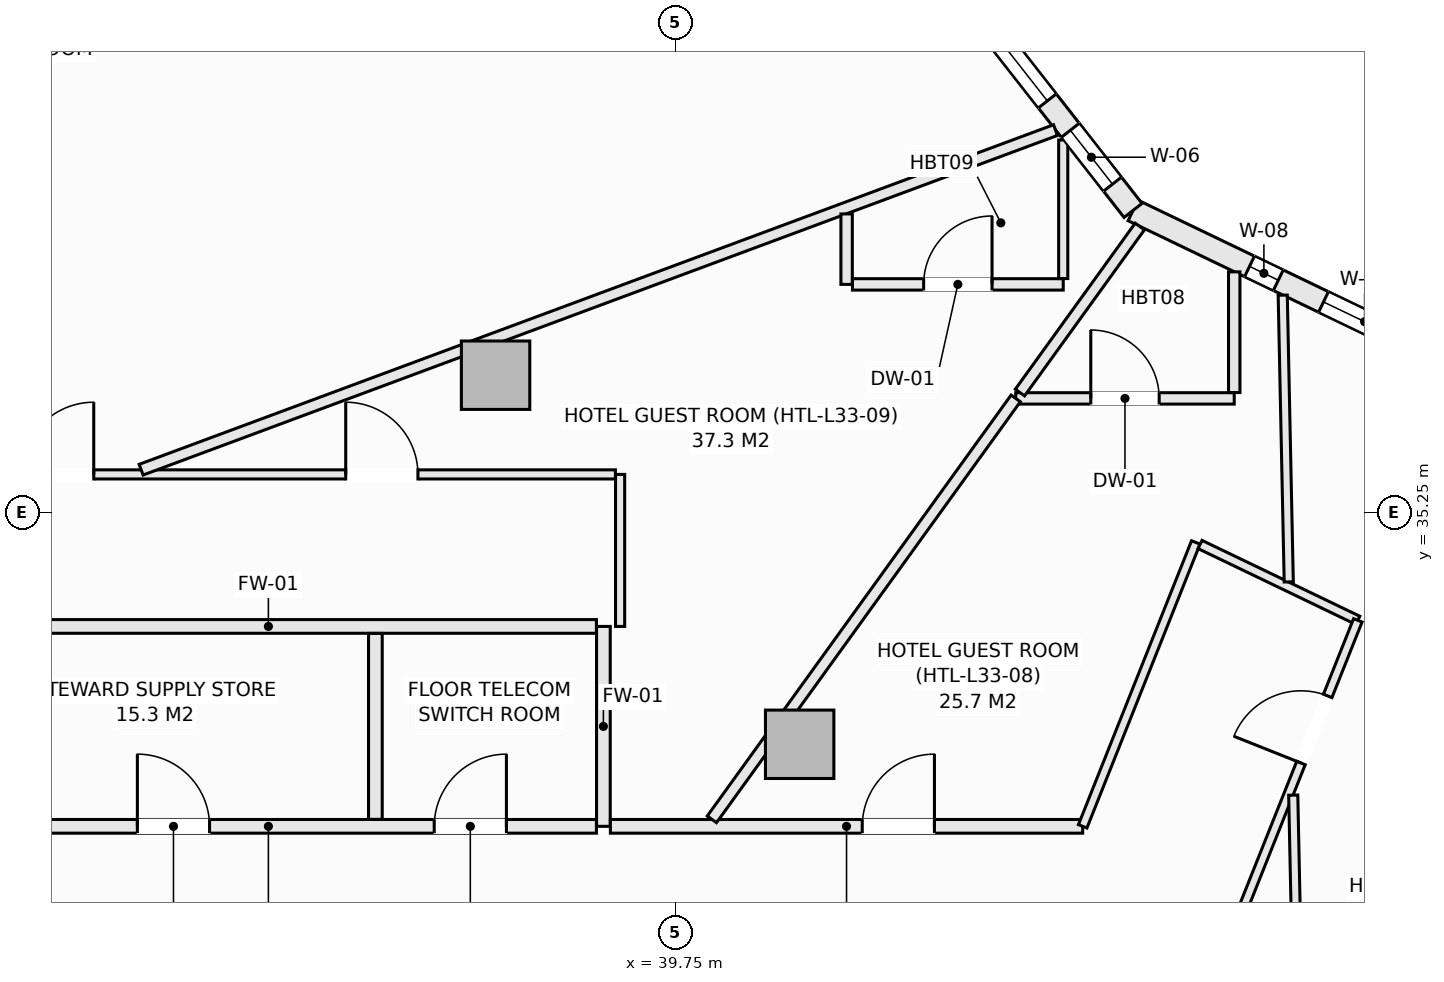
"""IFC4 building model, lengths in metres.
Left out: names, types, materials, properties, quantities, classifications, styles, units other than length and angle.
Written with IfcOpenShell. Run it as: python <this file> out.ifc"""

import sys

from ifc_helpers import new_model, si_unit, direction, frame, frame_2d, origin, origin_2d, place, context, subcontext, project, spatial, rectangle, extrude, element, fill, save


model = new_model("IFC4")
c1 = context("Model", 3, precision=1e-05, world=origin(), true_north=direction((0.0, 1.0)))
c2 = subcontext(c1, "Body", "Model", "MODEL_VIEW")
j1 = project(units=[si_unit("LENGTHUNIT", "METRE"), si_unit("PLANEANGLEUNIT", "RADIAN")], contexts=[c1])
p1 = place(None, origin())
s1 = spatial("IfcSite", under=j1, at=p1, CompositionType="ELEMENT")
p2 = place(p1, origin())
s2 = spatial("IfcBuilding", under=s1, at=p2, CompositionType="ELEMENT")
p3 = place(p2, frame((0.0, 0.0, 132.5)))
s3 = spatial("IfcBuildingStorey", under=s2, at=p3, CompositionType="ELEMENT", Elevation=132.5)
for number, where, z_axis, x_axis in (
    (1, (41.382, 32.199, -0.27), (0.0, 0.0, 1.0), (1.0, 0.0, 0.0)),
    (2, (37.382, 37.055, -0.27), (0.0, 0.0, 1.0), (1.0, 0.0, 0.0)),
):
    element("IfcColumn", number, at=place(p3, frame(where, z_axis=z_axis, x_axis=x_axis)), inside=s3, PredefinedType="COLUMN", context=c2, shape_type="SweptSolid", body=[
        extrude(rectangle(XDim=0.9, YDim=0.9, at=origin_2d()), origin(), (0.0, 0.0, 1.0), 3.4),
    ])
p4 = place(p3, frame((45.769, 39.223, 0.0), z_axis=(0.0, 0.0, 1.0), x_axis=(0.901370184739, -0.433049408339, 0.0)))
e3 = element("IfcWall", 3, at=p4, inside=s3, PredefinedType="SOLIDWALL", context=c2, shape_type="SweptSolid", body=[
    extrude(rectangle(XDim=5.884, YDim=0.3, at=frame_2d((2.942, 0.0))), origin(), (0.0, 0.0, 1.0), 2.653),
])
p5 = place(p4, frame((2.78, 0.0, 0.72)))
e4 = element("IfcOpeningElement", 4, at=p5, cuts=e3, PredefinedType="OPENING", context=c2, shape_type="SweptSolid", body=[
    extrude(rectangle(XDim=1.2, YDim=1.65, at=frame_2d((0.6, 0.825))), frame((0.0, 0.16, 0.0), z_axis=(0.0, -1.0, 0.0), x_axis=(1.0, 0.0, 0.0)), (0.0, 0.0, 1.0), 0.32),
])
p6 = place(p4, frame((1.7, 0.0, 0.72)))
e5 = element("IfcOpeningElement", 5, at=p6, cuts=e3, PredefinedType="OPENING", context=c2, shape_type="SweptSolid", body=[
    extrude(rectangle(XDim=0.42, YDim=1.65, at=frame_2d((0.21, 0.825))), frame((0.0, 0.16, 0.0), z_axis=(0.0, -1.0, 0.0), x_axis=(1.0, 0.0, 0.0)), (0.0, 0.0, 1.0), 0.32),
])
p7 = place(p3, frame((42.219, 43.758, 0.0), z_axis=(0.0, 0.0, 1.0), x_axis=(0.616435134162, -0.787405693001, 0.0)))
e6 = element("IfcWall", 6, at=p7, inside=s3, PredefinedType="SOLIDWALL", context=c2, shape_type="SweptSolid", body=[
    extrude(rectangle(XDim=5.759, YDim=0.3, at=frame_2d((2.879, 0.0))), origin(), (0.0, 0.0, 1.0), 2.653),
])
p8 = place(p7, frame((1.829, 0.0, 0.74)))
e7 = element("IfcOpeningElement", 7, at=p8, cuts=e6, PredefinedType="OPENING", context=c2, shape_type="SweptSolid", body=[
    extrude(rectangle(XDim=2.1, YDim=1.7, at=frame_2d((1.05, 0.85))), frame((0.0, 0.16, 0.0), z_axis=(0.0, -1.0, 0.0), x_axis=(1.0, 0.0, 0.0)), (0.0, 0.0, 1.0), 0.32),
])
p9 = place(p7, frame((4.42, 0.0, 0.72)))
e8 = element("IfcOpeningElement", 8, at=p9, cuts=e6, PredefinedType="OPENING", context=c2, shape_type="SweptSolid", body=[
    extrude(rectangle(XDim=0.9, YDim=1.65, at=frame_2d((0.45, 0.825))), frame((0.0, 0.16, 0.0), z_axis=(0.0, -1.0, 0.0), x_axis=(1.0, 0.0, 0.0)), (0.0, 0.0, 1.0), 0.32),
])
p10 = place(p3, frame((38.8, 31.12, 0.0), z_axis=(0.0, 0.0, 1.0), x_axis=(0.0, 1.0, 0.0)))
e9 = element("IfcWall", 9, at=p10, inside=s3, PredefinedType="SOLIDWALL", context=c2, shape_type="SweptSolid", body=[
    extrude(rectangle(XDim=2.63, YDim=0.18, at=frame_2d((1.315, 0.0))), origin(), (0.0, 0.0, 1.0), 3.13),
])
p11 = place(p3, frame((30.077, 31.12, 0.0), z_axis=(0.0, 0.0, 1.0), x_axis=(1.0, 0.0, 0.0)))
e10 = element("IfcWall", 10, at=p11, inside=s3, PredefinedType="SOLIDWALL", context=c2, shape_type="SweptSolid", body=[
    extrude(rectangle(XDim=8.631, YDim=0.18, at=frame_2d((4.315, 0.0))), origin(), (0.0, 0.0, 1.0), 3.13),
])
p12 = place(p11, frame((2.592, 0.0, 0.0)))
e11 = element("IfcOpeningElement", 11, at=p12, cuts=e10, PredefinedType="OPENING", context=c2, shape_type="SweptSolid", body=[
    extrude(rectangle(XDim=0.95, YDim=2.1, at=frame_2d((0.475, 1.05))), frame((0.0, 0.1, 0.0), z_axis=(0.0, -1.0, 0.0), x_axis=(1.0, 0.0, 0.0)), (0.0, 0.0, 1.0), 0.2),
])
p13 = place(p11, frame((6.497, 0.0, 0.0)))
e12 = element("IfcOpeningElement", 12, at=p13, cuts=e10, PredefinedType="OPENING", context=c2, shape_type="SweptSolid", body=[
    extrude(rectangle(XDim=0.95, YDim=2.1, at=frame_2d((0.475, 1.05))), frame((0.0, 0.1, 0.0), z_axis=(0.0, -1.0, 0.0), x_axis=(1.0, 0.0, 0.0)), (0.0, 0.0, 1.0), 0.2),
])
p14 = place(p3, frame((38.892, 31.12, 0.0), z_axis=(0.0, 0.0, 1.0), x_axis=(1.0, 0.0, 0.0)))
e13 = element("IfcWall", 13, at=p14, inside=s3, PredefinedType="SOLIDWALL", context=c2, shape_type="SweptSolid", body=[
    extrude(rectangle(XDim=6.214, YDim=0.18, at=frame_2d((3.107, 0.0))), origin(), (0.0, 0.0, 1.0), 3.13),
])
p15 = place(p14, frame((3.313, 0.0, 0.0)))
e14 = element("IfcOpeningElement", 14, at=p15, cuts=e13, PredefinedType="OPENING", context=c2, shape_type="SweptSolid", body=[
    extrude(rectangle(XDim=0.95, YDim=2.1, at=frame_2d((0.475, 1.05))), frame((0.0, 0.1, 0.0), z_axis=(0.0, -1.0, 0.0), x_axis=(1.0, 0.0, 0.0)), (0.0, 0.0, 1.0), 0.2),
])
p16 = place(p3, frame((30.077, 33.75, 0.0), z_axis=(0.0, 0.0, 1.0), x_axis=(1.0, 0.0, 0.0)))
e15 = element("IfcWall", 15, at=p16, inside=s3, PredefinedType="SOLIDWALL", context=c2, shape_type="SweptSolid", body=[
    extrude(rectangle(XDim=8.631, YDim=0.18, at=frame_2d((4.315, 0.0))), origin(), (0.0, 0.0, 1.0), 3.13),
])
p17 = place(p3, frame((35.8, 31.212, 0.0), z_axis=(0.0, 0.0, 1.0), x_axis=(0.0, 1.0, 0.0)))
e16 = element("IfcWall", 16, at=p17, inside=s3, PredefinedType="SOLIDWALL", context=c2, shape_type="SweptSolid", body=[
    extrude(rectangle(XDim=2.446, YDim=0.18, at=frame_2d((1.223, 0.0))), origin(), (0.0, 0.0, 1.0), 3.13),
])
p18 = place(p3, frame((39.02, 33.75, 0.0), z_axis=(0.0, 0.0, 1.0), x_axis=(0.0, 1.0, 0.0)))
e17 = element("IfcWall", 17, at=p18, inside=s3, PredefinedType="PARTITIONING", context=c2, shape_type="SweptSolid", body=[
    extrude(rectangle(XDim=2.0, YDim=0.12, at=frame_2d((1.0, 0.0))), origin(), (0.0, 0.0, 1.0), 3.13),
])
p19 = place(p3, frame((29.842, 35.75, 0.0), z_axis=(0.0, 0.0, 1.0), x_axis=(1.0, 0.0, 0.0)))
e18 = element("IfcWall", 18, at=p19, inside=s3, PredefinedType="PARTITIONING", context=c2, shape_type="SweptSolid", body=[
    extrude(rectangle(XDim=9.116, YDim=0.12, at=frame_2d((4.558, 0.0))), origin(), (0.0, 0.0, 1.0), 2.505),
])
p20 = place(p19, frame((5.568, 0.0, 0.0)))
e19 = element("IfcOpeningElement", 19, at=p20, cuts=e18, PredefinedType="OPENING", context=c2, shape_type="SweptSolid", body=[
    extrude(rectangle(XDim=0.95, YDim=2.1, at=frame_2d((0.475, 1.05))), frame((0.0, 0.07, 0.0), z_axis=(0.0, -1.0, 0.0), x_axis=(1.0, 0.0, 0.0)), (0.0, 0.0, 1.0), 0.14),
])
p21 = place(p19, frame((1.302, 0.0, 0.0)))
e20 = element("IfcOpeningElement", 20, at=p21, cuts=e18, PredefinedType="OPENING", context=c2, shape_type="SweptSolid", body=[
    extrude(rectangle(XDim=0.95, YDim=2.1, at=frame_2d((0.475, 1.05))), frame((0.0, 0.07, 0.0), z_axis=(0.0, -1.0, 0.0), x_axis=(1.0, 0.0, 0.0)), (0.0, 0.0, 1.0), 0.14),
])
p22 = place(p3, frame((45.106, 31.12, 0.0), z_axis=(0.0, 0.0, 1.0), x_axis=(0.370123465787, 0.928982572535, 0.0)))
e21 = element("IfcWall", 21, at=p22, inside=s3, PredefinedType="PARTITIONING", context=c2, shape_type="SweptSolid", body=[
    extrude(rectangle(XDim=4.02, YDim=0.12, at=frame_2d((2.01, 0.0))), origin(), (0.0, 0.0, 1.0), 3.13),
])
p23 = place(p3, frame((46.65, 34.828, 0.0), z_axis=(0.0, 0.0, 1.0), x_axis=(0.901271525254, -0.433254703109, 0.0)))
e22 = element("IfcWall", 22, at=p23, inside=s3, PredefinedType="PARTITIONING", context=c2, shape_type="SweptSolid", body=[
    extrude(rectangle(XDim=2.304, YDim=0.12, at=frame_2d((1.152, 0.0))), origin(), (0.0, 0.0, 1.0), 3.13),
])
p24 = place(p3, frame((46.946, 29.363, 0.0), z_axis=(0.0, 0.0, 1.0), x_axis=(0.370173596818, 0.928962597858, 0.0)))
e23 = element("IfcWall", 23, at=p24, inside=s3, PredefinedType="PARTITIONING", context=c2, shape_type="SweptSolid", body=[
    extrude(rectangle(XDim=4.809, YDim=0.12, at=frame_2d((2.404, 0.0))), origin(), (0.0, 0.0, 1.0), 3.13),
])
p25 = place(p24, frame((2.788, 0.0, 0.0)))
e24 = element("IfcOpeningElement", 24, at=p25, cuts=e23, PredefinedType="OPENING", context=c2, shape_type="SweptSolid", body=[
    extrude(rectangle(XDim=0.95, YDim=2.1, at=frame_2d((0.475, 1.05))), frame((0.0, 0.07, 0.0), z_axis=(0.0, -1.0, 0.0), x_axis=(1.0, 0.0, 0.0)), (0.0, 0.0, 1.0), 0.14),
])
p26 = place(p3, frame((47.738, 38.108, 0.0), z_axis=(0.0, 0.0, 1.0), x_axis=(0.021028225265, -0.999778882425, 0.0)))
e25 = element("IfcWall", 25, at=p26, inside=s3, PredefinedType="PARTITIONING", context=c2, shape_type="SweptSolid", body=[
    extrude(rectangle(XDim=3.773, YDim=0.12, at=frame_2d((1.887, 0.0))), origin(), (0.0, 0.0, 1.0), 3.13),
])
p27 = place(p3, frame((47.876, 31.53, 0.0), z_axis=(0.0, 0.0, 1.0), x_axis=(0.021060407881, -0.999778205013, 0.0)))
e26 = element("IfcWall", 26, at=p27, inside=s3, PredefinedType="PARTITIONING", context=c2, shape_type="SweptSolid", body=[
    extrude(rectangle(XDim=6.608, YDim=0.12, at=frame_2d((3.304, 0.0))), origin(), (0.0, 0.0, 1.0), 3.13),
])
p28 = place(p3, frame((44.225, 36.75, 0.0), z_axis=(0.0, 0.0, 1.0), x_axis=(1.0, 0.0, 0.0)))
e27 = element("IfcWall", 27, at=p28, inside=s3, PredefinedType="PARTITIONING", context=c2, shape_type="SweptSolid", body=[
    extrude(rectangle(XDim=2.875, YDim=0.15, at=frame_2d((1.438, 0.0))), origin(), (0.0, 0.0, 1.0), 3.13),
])
p29 = place(p28, frame((0.988, 0.0, 0.0)))
e28 = element("IfcOpeningElement", 28, at=p29, cuts=e27, PredefinedType="OPENING", context=c2, shape_type="SweptSolid", body=[
    extrude(rectangle(XDim=0.9, YDim=2.1, at=frame_2d((0.45, 1.05))), frame((0.0, 0.085, 0.0), z_axis=(0.0, -1.0, 0.0), x_axis=(1.0, 0.0, 0.0)), (0.0, 0.0, 1.0), 0.17),
])
p30 = place(p3, frame((47.1, 36.827, 0.0), z_axis=(0.0, 0.0, 1.0), x_axis=(0.0, 1.0, 0.0)))
e29 = element("IfcWall", 29, at=p30, inside=s3, PredefinedType="PARTITIONING", context=c2, shape_type="SweptSolid", body=[
    extrude(rectangle(XDim=1.588, YDim=0.15, at=frame_2d((0.794, 0.0))), origin(), (0.0, 0.0, 1.0), 3.13),
])
p31 = place(p3, frame((40.227, 31.212, 0.0), z_axis=(0.0, 0.0, 1.0), x_axis=(0.58530522165, 0.8108130472, 0.0)))
e30 = element("IfcWall", 30, at=p31, inside=s3, PredefinedType="PARTITIONING", context=c2, shape_type="SweptSolid", body=[
    extrude(rectangle(XDim=6.83, YDim=0.15, at=frame_2d((3.415, 0.0))), origin(), (0.0, 0.0, 1.0), 3.13),
])
p32 = place(p3, frame((44.281, 36.827, 0.0), z_axis=(0.0, 0.0, 1.0), x_axis=(0.585301978725, 0.810815388175, 0.0)))
e31 = element("IfcWall", 31, at=p32, inside=s3, PredefinedType="PARTITIONING", context=c2, shape_type="SweptSolid", body=[
    extrude(rectangle(XDim=2.695, YDim=0.15, at=frame_2d((1.347, 0.0))), origin(), (0.0, 0.0, 1.0), 3.13),
])
p33 = place(p3, frame((32.718, 35.812, 0.0), z_axis=(0.0, 0.0, 1.0), x_axis=(0.93744088354, 0.348144495673, 0.0)))
e32 = element("IfcWall", 32, at=p33, inside=s3, PredefinedType="PARTITIONING", context=c2, shape_type="SweptSolid", body=[
    extrude(rectangle(XDim=12.833, YDim=0.15, at=frame_2d((6.417, 0.0))), origin(), (0.0, 0.0, 1.0), 2.505),
])
p34 = place(p3, frame((42.0, 38.25, 0.0), z_axis=(0.0, 0.0, 1.0), x_axis=(0.0, 1.0, 0.0)))
e33 = element("IfcWall", 33, at=p34, inside=s3, PredefinedType="PARTITIONING", context=c2, shape_type="SweptSolid", body=[
    extrude(rectangle(XDim=0.927, YDim=0.15, at=frame_2d((0.463, 0.0))), origin(), (0.0, 0.0, 1.0), 3.13),
])
p35 = place(p3, frame((42.077, 38.25, 0.0), z_axis=(0.0, 0.0, 1.0), x_axis=(1.0, 0.0, 0.0)))
e34 = element("IfcWall", 34, at=p35, inside=s3, PredefinedType="PARTITIONING", context=c2, shape_type="SweptSolid", body=[
    extrude(rectangle(XDim=2.773, YDim=0.15, at=frame_2d((1.387, 0.0))), origin(), (0.0, 0.0, 1.0), 2.812),
])
p36 = place(p35, frame((0.937, 0.0, 0.0)))
e35 = element("IfcOpeningElement", 35, at=p36, cuts=e34, PredefinedType="OPENING", context=c2, shape_type="SweptSolid", body=[
    extrude(rectangle(XDim=0.9, YDim=2.1, at=frame_2d((0.45, 1.05))), frame((0.0, 0.085, 0.0), z_axis=(0.0, -1.0, 0.0), x_axis=(1.0, 0.0, 0.0)), (0.0, 0.0, 1.0), 0.17),
])
p37 = place(p3, frame((44.85, 38.327, 0.0), z_axis=(0.0, 0.0, 1.0), x_axis=(0.0, 1.0, 0.0)))
e36 = element("IfcWall", 36, at=p37, inside=s3, PredefinedType="PARTITIONING", context=c2, shape_type="SweptSolid", body=[
    extrude(rectangle(XDim=1.823, YDim=0.12, at=frame_2d((0.912, 0.0))), origin(), (0.0, 0.0, 1.0), 3.13),
])
p38 = place(p5, origin())
e37 = element("IfcWindow", 37, at=p38, inside=s3, PartitioningType="SINGLE_PANEL", PredefinedType="WINDOW", context=c2, shape_type="SweptSolid", body=[
    extrude(rectangle(XDim=1.2, YDim=1.65, at=frame_2d((0.6, 0.825))), frame((0.0, 0.03, 0.0), z_axis=(0.0, -1.0, 0.0), x_axis=(1.0, 0.0, 0.0)), (0.0, 0.0, 1.0), 0.06),
])
fill(e4, e37)
p39 = place(p8, origin())
e38 = element("IfcWindow", 38, at=p39, inside=s3, PartitioningType="SINGLE_PANEL", PredefinedType="WINDOW", context=c2, shape_type="SweptSolid", body=[
    extrude(rectangle(XDim=2.1, YDim=1.7, at=frame_2d((1.05, 0.85))), frame((0.0, 0.03, 0.0), z_axis=(0.0, -1.0, 0.0), x_axis=(1.0, 0.0, 0.0)), (0.0, 0.0, 1.0), 0.06),
])
fill(e7, e38)
p40 = place(p12, origin())
e39 = element("IfcDoor", 39, at=p40, inside=s3, OperationType="SINGLE_SWING_LEFT", PredefinedType="DOOR", context=c2, shape_type="SweptSolid", body=[
    extrude(rectangle(XDim=0.95, YDim=2.1, at=frame_2d((0.475, 1.05))), frame((0.0, 0.025, 0.0), z_axis=(0.0, -1.0, 0.0), x_axis=(1.0, 0.0, 0.0)), (0.0, 0.0, 1.0), 0.05),
])
fill(e11, e39)
p41 = place(p13, origin())
e40 = element("IfcDoor", 40, at=p41, inside=s3, OperationType="SINGLE_SWING_RIGHT", PredefinedType="DOOR", context=c2, shape_type="SweptSolid", body=[
    extrude(rectangle(XDim=0.95, YDim=2.1, at=frame_2d((0.475, 1.05))), frame((0.0, 0.025, 0.0), z_axis=(0.0, -1.0, 0.0), x_axis=(1.0, 0.0, 0.0)), (0.0, 0.0, 1.0), 0.05),
])
fill(e12, e40)
p42 = place(p25, origin())
e41 = element("IfcDoor", 41, at=p42, inside=s3, OperationType="SINGLE_SWING_LEFT", PredefinedType="DOOR", context=c2, shape_type="SweptSolid", body=[
    extrude(rectangle(XDim=0.95, YDim=2.1, at=frame_2d((0.475, 1.05))), frame((0.0, 0.025, 0.0), z_axis=(0.0, -1.0, 0.0), x_axis=(1.0, 0.0, 0.0)), (0.0, 0.0, 1.0), 0.05),
])
fill(e24, e41)
p43 = place(p15, origin())
e42 = element("IfcDoor", 42, at=p43, inside=s3, OperationType="SINGLE_SWING_RIGHT", PredefinedType="DOOR", context=c2, shape_type="SweptSolid", body=[
    extrude(rectangle(XDim=0.95, YDim=2.1, at=frame_2d((0.475, 1.05))), frame((0.0, 0.025, 0.0), z_axis=(0.0, -1.0, 0.0), x_axis=(1.0, 0.0, 0.0)), (0.0, 0.0, 1.0), 0.05),
])
fill(e14, e42)
p44 = place(p20, origin())
e43 = element("IfcDoor", 43, at=p44, inside=s3, OperationType="SINGLE_SWING_LEFT", PredefinedType="DOOR", context=c2, shape_type="SweptSolid", body=[
    extrude(rectangle(XDim=0.95, YDim=2.1, at=frame_2d((0.475, 1.05))), frame((0.0, 0.025, 0.0), z_axis=(0.0, -1.0, 0.0), x_axis=(1.0, 0.0, 0.0)), (0.0, 0.0, 1.0), 0.05),
])
fill(e19, e43)
p45 = place(p21, origin())
e44 = element("IfcDoor", 44, at=p45, inside=s3, OperationType="SINGLE_SWING_RIGHT", PredefinedType="DOOR", context=c2, shape_type="SweptSolid", body=[
    extrude(rectangle(XDim=0.95, YDim=2.1, at=frame_2d((0.475, 1.05))), frame((0.0, 0.025, 0.0), z_axis=(0.0, -1.0, 0.0), x_axis=(1.0, 0.0, 0.0)), (0.0, 0.0, 1.0), 0.05),
])
fill(e20, e44)
p46 = place(p29, origin())
e45 = element("IfcDoor", 45, at=p46, inside=s3, OperationType="SINGLE_SWING_LEFT", PredefinedType="DOOR", context=c2, shape_type="SweptSolid", body=[
    extrude(rectangle(XDim=0.9, YDim=2.1, at=frame_2d((0.45, 1.05))), frame((0.0, 0.025, 0.0), z_axis=(0.0, -1.0, 0.0), x_axis=(1.0, 0.0, 0.0)), (0.0, 0.0, 1.0), 0.05),
])
fill(e28, e45)
p47 = place(p36, origin())
e46 = element("IfcDoor", 46, at=p47, inside=s3, OperationType="SINGLE_SWING_RIGHT", PredefinedType="DOOR", context=c2, shape_type="SweptSolid", body=[
    extrude(rectangle(XDim=0.9, YDim=2.1, at=frame_2d((0.45, 1.05))), frame((0.0, 0.025, 0.0), z_axis=(0.0, -1.0, 0.0), x_axis=(1.0, 0.0, 0.0)), (0.0, 0.0, 1.0), 0.05),
])
fill(e35, e46)
p48 = place(p6, origin())
e47 = element("IfcWindow", 47, at=p48, inside=s3, PartitioningType="SINGLE_PANEL", PredefinedType="WINDOW", context=c2, shape_type="SweptSolid", body=[
    extrude(rectangle(XDim=0.42, YDim=1.65, at=frame_2d((0.21, 0.825))), frame((0.0, 0.03, 0.0), z_axis=(0.0, -1.0, 0.0), x_axis=(1.0, 0.0, 0.0)), (0.0, 0.0, 1.0), 0.06),
])
fill(e5, e47)
p49 = place(p9, origin())
e48 = element("IfcWindow", 48, at=p49, inside=s3, PartitioningType="SINGLE_PANEL", PredefinedType="WINDOW", context=c2, shape_type="SweptSolid", body=[
    extrude(rectangle(XDim=0.9, YDim=1.65, at=frame_2d((0.45, 0.825))), frame((0.0, 0.03, 0.0), z_axis=(0.0, -1.0, 0.0), x_axis=(1.0, 0.0, 0.0)), (0.0, 0.0, 1.0), 0.06),
])
fill(e8, e48)
save(model, sys.argv[1])
